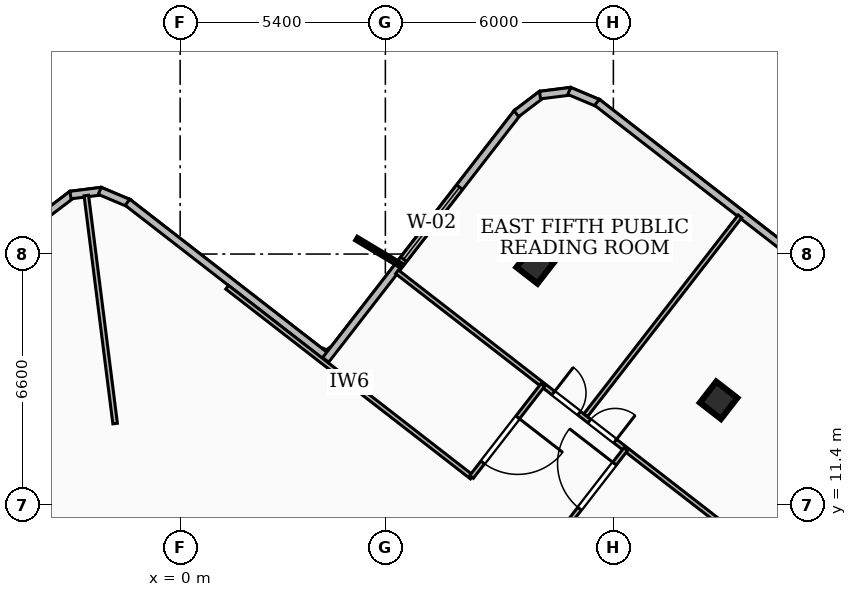
"""IFC4 building model, lengths in metres.
Left out: names, types, materials, properties, quantities, classifications, styles, units other than length and angle.
Written with IfcOpenShell. Run it as: python <this file> out.ifc"""

import sys

from ifc_helpers import new_model, si_unit, direction, frame, frame_2d, origin, origin_2d, place, context, subcontext, project, spatial, rectangle, extrude, element, fill, save


model = new_model("IFC4")
c1 = context("Model", 3, precision=1e-05, world=origin(), true_north=direction((0.0, 1.0)))
c2 = subcontext(c1, "Body", "Model", "MODEL_VIEW")
j1 = project(units=[si_unit("LENGTHUNIT", "METRE"), si_unit("PLANEANGLEUNIT", "RADIAN")], contexts=[c1])
p1 = place(None, origin())
s1 = spatial("IfcSite", under=j1, at=p1, CompositionType="ELEMENT")
p2 = place(p1, origin())
s2 = spatial("IfcBuilding", under=s1, at=p2, CompositionType="ELEMENT")
p3 = place(p2, frame((0.0, 0.0, 257.76)))
s3 = spatial("IfcBuildingStorey", under=s2, at=p3, CompositionType="ELEMENT", Elevation=257.76)
for number, where, z_axis, x_axis in (
    (1, (14.169, 14.152, 0.0), (0.0, 0.0, 1.0), (0.613, 0.79, 0.0)),
    (2, (9.341, 17.714, 0.0), (0.0, 0.0, 1.0), (0.613, 0.79, 0.0)),
):
    element("IfcColumn", number, at=place(p3, frame(where, z_axis=z_axis, x_axis=x_axis)), inside=s3, PredefinedType="COLUMN", context=c2, shape_type="SweptSolid", body=[
        extrude(rectangle(XDim=0.7, YDim=0.7, at=origin_2d()), origin(), (0.0, 0.0, 1.0), 3.42),
    ])
p4 = place(p3, frame((-3.509, 19.064, 0.0), z_axis=(0.0, 0.0, 1.0), x_axis=(0.797053904317, 0.603908166539, 0.0)))
e3 = element("IfcWall", 3, at=p4, inside=s3, PredefinedType="SOLIDWALL", context=c2, shape_type="SweptSolid", body=[
    extrude(rectangle(XDim=0.838, YDim=0.2, at=frame_2d((0.419, 0.0))), origin(), (0.0, 0.0, 1.0), 3.16),
])
p5 = place(p3, frame((-2.886, 19.552, 0.0), z_axis=(0.0, 0.0, 1.0), x_axis=(0.992182038023, 0.124799052175, 0.0)))
e4 = element("IfcWall", 4, at=p5, inside=s3, PredefinedType="SOLIDWALL", context=c2, shape_type="SweptSolid", body=[
    extrude(rectangle(XDim=0.825, YDim=0.2, at=frame_2d((0.413, 0.0))), origin(), (0.0, 0.0, 1.0), 3.16),
])
p6 = place(p3, frame((-2.115, 19.662, 0.0), z_axis=(0.0, 0.0, 1.0), x_axis=(0.921569528133, -0.388213349612, 0.0)))
e5 = element("IfcWall", 5, at=p6, inside=s3, PredefinedType="SOLIDWALL", context=c2, shape_type="SweptSolid", body=[
    extrude(rectangle(XDim=0.838, YDim=0.2, at=frame_2d((0.419, 0.0))), origin(), (0.0, 0.0, 1.0), 3.16),
])
p7 = place(p3, frame((-1.386, 19.362, 0.0), z_axis=(0.0, 0.0, 1.0), x_axis=(0.790076990755, -0.613007625303, 0.0)))
e6 = element("IfcWall", 6, at=p7, inside=s3, PredefinedType="SOLIDWALL", context=c2, shape_type="SweptSolid", body=[
    extrude(rectangle(XDim=6.742, YDim=0.2, at=frame_2d((3.371, 0.0))), origin(), (0.0, 0.0, 1.0), 3.16),
])
p8 = place(p3, frame((3.829, 15.215, 0.0), z_axis=(0.0, 0.0, 1.0), x_axis=(0.612910709336, 0.790152176724, 0.0)))
e7 = element("IfcWall", 7, at=p8, inside=s3, PredefinedType="SOLIDWALL", context=c2, shape_type="SweptSolid", body=[
    extrude(rectangle(XDim=8.243, YDim=0.2, at=frame_2d((4.121, 0.0))), origin(), (0.0, 0.0, 1.0), 3.16),
])
p9 = place(p8, frame((3.35, 0.0, 0.85)))
e8 = element("IfcOpeningElement", 8, at=p9, cuts=e7, PredefinedType="OPENING", context=c2, shape_type="SweptSolid", body=[
    extrude(rectangle(XDim=2.4, YDim=2.1, at=frame_2d((1.2, 1.05))), frame((0.0, 0.11, 0.0), z_axis=(0.0, -1.0, 0.0), x_axis=(1.0, 0.0, 0.0)), (0.0, 0.0, 1.0), 0.22),
])
p10 = place(p3, frame((8.846, 21.693, 0.0), z_axis=(0.0, 0.0, 1.0), x_axis=(0.796633253556, 0.604462951163, 0.0)))
e9 = element("IfcWall", 9, at=p10, inside=s3, PredefinedType="SOLIDWALL", context=c2, shape_type="SweptSolid", body=[
    extrude(rectangle(XDim=0.838, YDim=0.2, at=frame_2d((0.419, 0.0))), origin(), (0.0, 0.0, 1.0), 3.16),
])
p11 = place(p3, frame((9.469, 22.182, 0.0), z_axis=(0.0, 0.0, 1.0), x_axis=(0.992163581644, 0.124945697241, 0.0)))
e10 = element("IfcWall", 10, at=p11, inside=s3, PredefinedType="SOLIDWALL", context=c2, shape_type="SweptSolid", body=[
    extrude(rectangle(XDim=0.824, YDim=0.2, at=frame_2d((0.412, 0.0))), origin(), (0.0, 0.0, 1.0), 3.16),
])
p12 = place(p3, frame((10.239, 22.292, 0.0), z_axis=(0.0, 0.0, 1.0), x_axis=(0.92184898946, -0.387549275101, 0.0)))
e11 = element("IfcWall", 11, at=p12, inside=s3, PredefinedType="SOLIDWALL", context=c2, shape_type="SweptSolid", body=[
    extrude(rectangle(XDim=0.838, YDim=0.2, at=frame_2d((0.419, 0.0))), origin(), (0.0, 0.0, 1.0), 3.16),
])
p13 = place(p3, frame((10.969, 21.992, 0.0), z_axis=(0.0, 0.0, 1.0), x_axis=(0.790145127041, -0.612919797537, 0.0)))
e12 = element("IfcWall", 12, at=p13, inside=s3, PredefinedType="SOLIDWALL", context=c2, shape_type="SweptSolid", body=[
    extrude(rectangle(XDim=9.823, YDim=0.2, at=frame_2d((4.912, 0.0))), origin(), (0.0, 0.0, 1.0), 3.16),
])
p14 = place(p13, frame((6.462, 0.0, 0.85)))
e13 = element("IfcOpeningElement", 13, at=p14, cuts=e12, PredefinedType="OPENING", context=c2, shape_type="SweptSolid", body=[
    extrude(rectangle(XDim=2.4, YDim=1.85, at=frame_2d((1.2, 0.925))), frame((0.0, 0.11, 0.0), z_axis=(0.0, -1.0, 0.0), x_axis=(1.0, 0.0, 0.0)), (0.0, 0.0, 1.0), 0.22),
])
p15 = place(p3, frame((18.995, 13.883, 0.0), z_axis=(0.0, 0.0, 1.0), x_axis=(-0.612894114019, -0.790165049215, 0.0)))
e14 = element("IfcWall", 14, at=p15, inside=s3, PredefinedType="SOLIDWALL", context=c2, shape_type="SweptSolid", body=[
    extrude(rectangle(XDim=8.241, YDim=0.2, at=frame_2d((4.121, 0.0))), origin(), (0.0, 0.0, 1.0), 3.16),
])
p16 = place(p15, frame((0.85, 0.0, 0.85)))
e15 = element("IfcOpeningElement", 15, at=p16, cuts=e14, PredefinedType="OPENING", context=c2, shape_type="SweptSolid", body=[
    extrude(rectangle(XDim=2.4, YDim=1.65, at=frame_2d((1.2, 0.825))), frame((0.0, 0.11, 0.0), z_axis=(0.0, -1.0, 0.0), x_axis=(1.0, 0.0, 0.0)), (0.0, 0.0, 1.0), 0.22),
])
p17 = place(p3, frame((-1.711, 13.54, 0.0), z_axis=(0.0, 0.0, 1.0), x_axis=(-0.125366398214, 0.992110511082, 0.0)))
e16 = element("IfcWall", 16, at=p17, inside=s3, PredefinedType="PARTITIONING", context=c2, shape_type="SweptSolid", body=[
    extrude(rectangle(XDim=6.047, YDim=0.12, at=frame_2d((3.023, 0.0))), origin(), (0.0, 0.0, 1.0), 3.16),
])
p18 = place(p3, frame((7.676, 12.131, 0.0), z_axis=(0.0, 0.0, 1.0), x_axis=(-0.790137186805, 0.61293003355, 0.0)))
e17 = element("IfcWall", 17, at=p18, inside=s3, PredefinedType="PARTITIONING", context=c2, shape_type="SweptSolid", body=[
    extrude(rectangle(XDim=8.149, YDim=0.12, at=frame_2d((4.075, 0.0))), origin(), (0.0, 0.0, 1.0), 3.16),
])
p19 = place(p3, frame((9.544, 14.555, 0.0), z_axis=(0.0, 0.0, 1.0), x_axis=(-0.612990234131, -0.79009048397, 0.0)))
e18 = element("IfcWall", 18, at=p19, inside=s3, PredefinedType="PARTITIONING", context=c2, shape_type="SweptSolid", body=[
    extrude(rectangle(XDim=3.06, YDim=0.12, at=frame_2d((1.53, 0.0))), origin(), (0.0, 0.0, 1.0), 2.53),
])
p20 = place(p19, frame((1.08, 0.0, 0.0)))
e19 = element("IfcOpeningElement", 19, at=p20, cuts=e18, PredefinedType="OPENING", context=c2, shape_type="SweptSolid", body=[
    extrude(rectangle(XDim=1.5, YDim=2.12, at=frame_2d((0.75, 1.06))), frame((0.0, 0.07, 0.0), z_axis=(0.0, -1.0, 0.0), x_axis=(1.0, 0.0, 0.0)), (0.0, 0.0, 1.0), 0.14),
])
p21 = place(p3, frame((9.849, 10.446, 0.0), z_axis=(0.0, 0.0, 1.0), x_axis=(0.612945563076, 0.790125139902, 0.0)))
e20 = element("IfcWall", 20, at=p21, inside=s3, PredefinedType="PARTITIONING", context=c2, shape_type="SweptSolid", body=[
    extrude(rectangle(XDim=3.059, YDim=0.12, at=frame_2d((1.53, 0.0))), origin(), (0.0, 0.0, 1.0), 3.16),
])
p22 = place(p21, frame((1.08, 0.0, 0.0)))
e21 = element("IfcOpeningElement", 21, at=p22, cuts=e20, PredefinedType="OPENING", context=c2, shape_type="SweptSolid", body=[
    extrude(rectangle(XDim=1.5, YDim=2.12, at=frame_2d((0.75, 1.06))), frame((0.0, 0.07, 0.0), z_axis=(0.0, -1.0, 0.0), x_axis=(1.0, 0.0, 0.0)), (0.0, 0.0, 1.0), 0.14),
])
p23 = place(p3, frame((10.671, 13.757, 0.0), z_axis=(0.0, 0.0, 1.0), x_axis=(0.61292966537, 0.790137472412, 0.0)))
e22 = element("IfcWall", 22, at=p23, inside=s3, PredefinedType="PARTITIONING", context=c2, shape_type="SweptSolid", body=[
    extrude(rectangle(XDim=6.624, YDim=0.12, at=frame_2d((3.312, 0.0))), origin(), (0.0, 0.0, 1.0), 3.16),
])
p24 = place(p3, frame((5.707, 17.531, 0.0), z_axis=(0.0, 0.0, 1.0), x_axis=(0.790153529347, -0.612908965557, 0.0)))
e23 = element("IfcWall", 23, at=p24, inside=s3, PredefinedType="PARTITIONING", context=c2, shape_type="SweptSolid", body=[
    extrude(rectangle(XDim=12.671, YDim=0.12, at=frame_2d((6.335, 0.0))), origin(), (0.0, 0.0, 1.0), 2.53),
])
p25 = place(p24, frame((6.405, 0.0, 0.0)))
e24 = element("IfcOpeningElement", 24, at=p25, cuts=e23, PredefinedType="OPENING", context=c2, shape_type="SweptSolid", body=[
    extrude(rectangle(XDim=0.86, YDim=2.04, at=frame_2d((0.43, 1.02))), frame((0.0, 0.07, 0.0), z_axis=(0.0, -1.0, 0.0), x_axis=(1.0, 0.0, 0.0)), (0.0, 0.0, 1.0), 0.14),
])
p26 = place(p24, frame((5.205, 0.0, 0.0)))
e25 = element("IfcOpeningElement", 25, at=p26, cuts=e23, PredefinedType="OPENING", context=c2, shape_type="SweptSolid", body=[
    extrude(rectangle(XDim=0.86, YDim=2.04, at=frame_2d((0.43, 1.02))), frame((0.0, 0.07, 0.0), z_axis=(0.0, -1.0, 0.0), x_axis=(1.0, 0.0, 0.0)), (0.0, 0.0, 1.0), 0.14),
])
p27 = place(p9, origin())
e26 = element("IfcWindow", 26, at=p27, inside=s3, PartitioningType="SINGLE_PANEL", PredefinedType="WINDOW", context=c2, shape_type="SweptSolid", body=[
    extrude(rectangle(XDim=2.4, YDim=2.1, at=frame_2d((1.2, 1.05))), frame((0.0, 0.03, 0.0), z_axis=(0.0, -1.0, 0.0), x_axis=(1.0, 0.0, 0.0)), (0.0, 0.0, 1.0), 0.06),
])
fill(e8, e26)
p28 = place(p20, origin())
e27 = element("IfcDoor", 27, at=p28, inside=s3, OperationType="SINGLE_SWING_LEFT", PredefinedType="DOOR", context=c2, shape_type="SweptSolid", body=[
    extrude(rectangle(XDim=1.5, YDim=2.12, at=frame_2d((0.75, 1.06))), frame((0.0, 0.025, 0.0), z_axis=(0.0, -1.0, 0.0), x_axis=(1.0, 0.0, 0.0)), (0.0, 0.0, 1.0), 0.05),
])
fill(e19, e27)
p29 = place(p22, origin())
e28 = element("IfcDoor", 28, at=p29, inside=s3, OperationType="SINGLE_SWING_RIGHT", PredefinedType="DOOR", context=c2, shape_type="SweptSolid", body=[
    extrude(rectangle(XDim=1.5, YDim=2.12, at=frame_2d((0.75, 1.06))), frame((0.0, 0.025, 0.0), z_axis=(0.0, -1.0, 0.0), x_axis=(1.0, 0.0, 0.0)), (0.0, 0.0, 1.0), 0.05),
])
fill(e21, e28)
p30 = place(p25, origin())
e29 = element("IfcDoor", 29, at=p30, inside=s3, OperationType="SINGLE_SWING_RIGHT", PredefinedType="DOOR", context=c2, shape_type="SweptSolid", body=[
    extrude(rectangle(XDim=0.86, YDim=2.04, at=frame_2d((0.43, 1.02))), frame((0.0, 0.025, 0.0), z_axis=(0.0, -1.0, 0.0), x_axis=(1.0, 0.0, 0.0)), (0.0, 0.0, 1.0), 0.05),
])
fill(e24, e29)
p31 = place(p26, origin())
e30 = element("IfcDoor", 30, at=p31, inside=s3, OperationType="SINGLE_SWING_LEFT", PredefinedType="DOOR", context=c2, shape_type="SweptSolid", body=[
    extrude(rectangle(XDim=0.86, YDim=2.04, at=frame_2d((0.43, 1.02))), frame((0.0, 0.025, 0.0), z_axis=(0.0, -1.0, 0.0), x_axis=(1.0, 0.0, 0.0)), (0.0, 0.0, 1.0), 0.05),
])
fill(e25, e30)
save(model, sys.argv[1])
